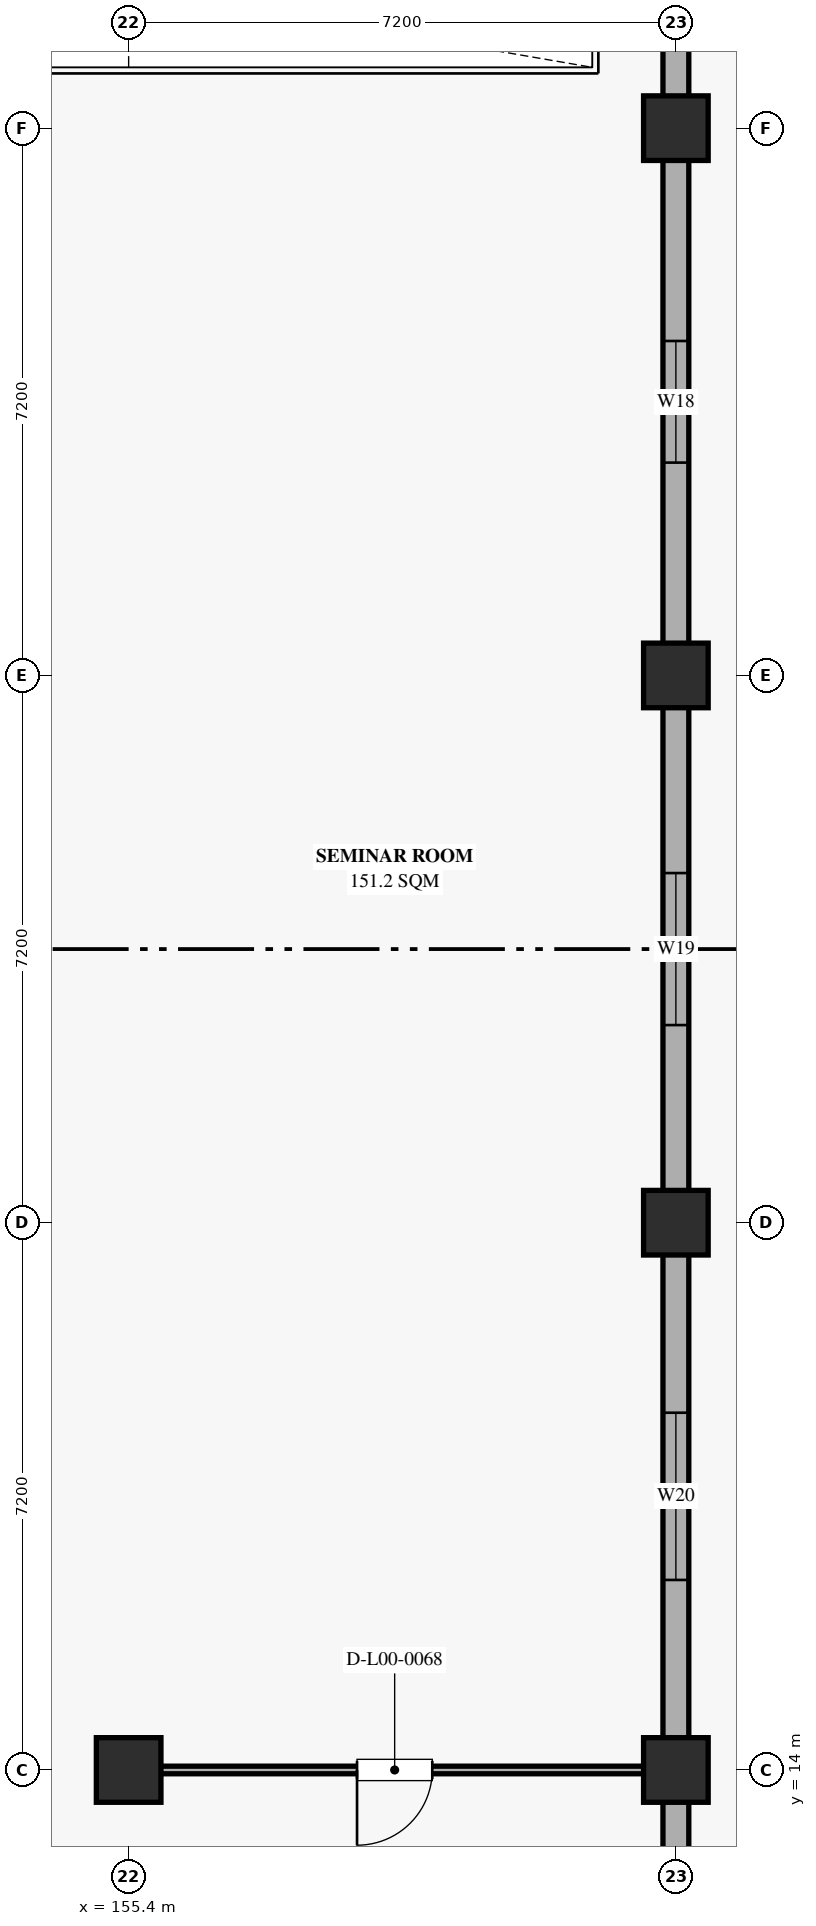
"""IFC4 building model, lengths in metres.
Left out: names, types, materials, properties, quantities, classifications, styles, units other than length and angle.
Written with IfcOpenShell. Run it as: python <this file> out.ifc"""

import sys

from ifc_helpers import new_model, si_unit, direction, frame, frame_2d, origin, origin_2d, place, context, subcontext, project, spatial, rectangle, extrude, element, fill, save


model = new_model("IFC4")
c1 = context("Model", 3, precision=1e-05, world=origin(), true_north=direction((0.0, 1.0)))
c2 = subcontext(c1, "Body", "Model", "MODEL_VIEW")
j1 = project(units=[si_unit("LENGTHUNIT", "METRE"), si_unit("PLANEANGLEUNIT", "RADIAN")], contexts=[c1])
p1 = place(None, origin())
s1 = spatial("IfcSite", under=j1, at=p1, CompositionType="ELEMENT")
p2 = place(p1, origin())
s2 = spatial("IfcBuilding", under=s1, at=p2, CompositionType="ELEMENT")
p3 = place(p2, origin())
s3 = spatial("IfcBuildingStorey", under=s2, at=p3, CompositionType="ELEMENT", Elevation=0.0)
for number, where, z_axis, x_axis in (
    (1, (155.4, 14.0, 0.0), (0.0, 0.0, 1.0), (1.0, 0.0, 0.0)),
    (2, (162.6, 14.0, 0.0), (0.0, 0.0, 1.0), (1.0, 0.0, 0.0)),
    (3, (162.6, 21.2, 0.0), (0.0, 0.0, 1.0), (1.0, 0.0, 0.0)),
    (4, (162.6, 28.4, 0.0), (0.0, 0.0, 1.0), (1.0, 0.0, 0.0)),
    (5, (162.6, 35.6, 0.0), (0.0, 0.0, 1.0), (1.0, 0.0, 0.0)),
):
    element("IfcColumn", number, at=place(p3, frame(where, z_axis=z_axis, x_axis=x_axis)), inside=s3, PredefinedType="COLUMN", context=c2, shape_type="SweptSolid", body=[
        extrude(rectangle(XDim=0.85, YDim=0.85, at=origin_2d()), origin(), (0.0, 0.0, 1.0), 5.4),
    ])
p4 = place(p3, frame((162.6, 42.39, 0.0), z_axis=(0.0, 0.0, 1.0), x_axis=(0.0, -1.0, 0.0)))
e6 = element("IfcWall", 6, at=p4, inside=s3, PredefinedType="SOLIDWALL", context=c2, shape_type="SweptSolid", body=[
    extrude(rectangle(XDim=6.38, YDim=0.34, at=frame_2d((3.19, 0.0))), origin(), (0.0, 0.0, 1.0), 3.9),
])
p5 = place(p4, frame((1.69, 0.0, 0.9)))
e7 = element("IfcOpeningElement", 7, at=p5, cuts=e6, PredefinedType="OPENING", context=c2, shape_type="SweptSolid", body=[
    extrude(rectangle(XDim=3.0, YDim=2.5, at=frame_2d((1.5, 1.25))), frame((0.0, 0.18, 0.0), z_axis=(0.0, -1.0, 0.0), x_axis=(1.0, 0.0, 0.0)), (0.0, 0.0, 1.0), 0.36),
])
p6 = place(p3, frame((162.6, 35.19, 0.0), z_axis=(0.0, 0.0, 1.0), x_axis=(0.0, -1.0, 0.0)))
e8 = element("IfcWall", 8, at=p6, inside=s3, PredefinedType="SOLIDWALL", context=c2, shape_type="SweptSolid", body=[
    extrude(rectangle(XDim=6.38, YDim=0.34, at=frame_2d((3.19, 0.0))), origin(), (0.0, 0.0, 1.0), 3.9),
])
p7 = place(p6, frame((2.39, 0.0, 0.9)))
e9 = element("IfcOpeningElement", 9, at=p7, cuts=e8, PredefinedType="OPENING", context=c2, shape_type="SweptSolid", body=[
    extrude(rectangle(XDim=1.6, YDim=2.2, at=frame_2d((0.8, 1.1))), frame((0.0, 0.18, 0.0), z_axis=(0.0, -1.0, 0.0), x_axis=(1.0, 0.0, 0.0)), (0.0, 0.0, 1.0), 0.36),
])
p8 = place(p3, frame((162.6, 27.99, 0.0), z_axis=(0.0, 0.0, 1.0), x_axis=(0.0, -1.0, 0.0)))
e10 = element("IfcWall", 10, at=p8, inside=s3, PredefinedType="SOLIDWALL", context=c2, shape_type="SweptSolid", body=[
    extrude(rectangle(XDim=6.38, YDim=0.34, at=frame_2d((3.19, 0.0))), origin(), (0.0, 0.0, 1.0), 3.9),
])
p9 = place(p8, frame((2.19, 0.0, 0.9)))
e11 = element("IfcOpeningElement", 11, at=p9, cuts=e10, PredefinedType="OPENING", context=c2, shape_type="SweptSolid", body=[
    extrude(rectangle(XDim=2.0, YDim=2.2, at=frame_2d((1.0, 1.1))), frame((0.0, 0.18, 0.0), z_axis=(0.0, -1.0, 0.0), x_axis=(1.0, 0.0, 0.0)), (0.0, 0.0, 1.0), 0.36),
])
p10 = place(p3, frame((162.6, 20.79, 0.0), z_axis=(0.0, 0.0, 1.0), x_axis=(0.0, -1.0, 0.0)))
e12 = element("IfcWall", 12, at=p10, inside=s3, PredefinedType="SOLIDWALL", context=c2, shape_type="SweptSolid", body=[
    extrude(rectangle(XDim=6.38, YDim=0.34, at=frame_2d((3.19, 0.0))), origin(), (0.0, 0.0, 1.0), 3.9),
])
p11 = place(p10, frame((2.09, 0.0, 0.9)))
e13 = element("IfcOpeningElement", 13, at=p11, cuts=e12, PredefinedType="OPENING", context=c2, shape_type="SweptSolid", body=[
    extrude(rectangle(XDim=2.2, YDim=2.0, at=frame_2d((1.1, 1.0))), frame((0.0, 0.18, 0.0), z_axis=(0.0, -1.0, 0.0), x_axis=(1.0, 0.0, 0.0)), (0.0, 0.0, 1.0), 0.36),
])
p12 = place(p3, frame((162.6, 13.59, 0.0), z_axis=(0.0, 0.0, 1.0), x_axis=(0.0, -1.0, 0.0)))
e14 = element("IfcWall", 14, at=p12, inside=s3, PredefinedType="SOLIDWALL", context=c2, shape_type="SweptSolid", body=[
    extrude(rectangle(XDim=6.38, YDim=0.34, at=frame_2d((3.19, 0.0))), origin(), (0.0, 0.0, 1.0), 3.9),
])
p13 = place(p12, frame((2.29, 0.0, 0.0)))
e15 = element("IfcOpeningElement", 15, at=p13, cuts=e14, PredefinedType="OPENING", context=c2, shape_type="SweptSolid", body=[
    extrude(rectangle(XDim=1.8, YDim=2.35, at=frame_2d((0.9, 1.175))), frame((0.0, 0.18, 0.0), z_axis=(0.0, -1.0, 0.0), x_axis=(1.0, 0.0, 0.0)), (0.0, 0.0, 1.0), 0.36),
])
p14 = place(p3, frame((162.25, 14.0, 0.0), z_axis=(0.0, 0.0, 1.0), x_axis=(-1.0, 0.0, 0.0)))
e16 = element("IfcWall", 16, at=p14, inside=s3, PredefinedType="PARTITIONING", context=c2, shape_type="SweptSolid", body=[
    extrude(rectangle(XDim=6.7, YDim=0.1, at=frame_2d((3.35, 0.0))), origin(), (0.0, 0.0, 1.0), 3.88),
])
p15 = place(p14, frame((2.855, 0.0, 0.0)))
e17 = element("IfcOpeningElement", 17, at=p15, cuts=e16, PredefinedType="OPENING", context=c2, shape_type="SweptSolid", body=[
    extrude(rectangle(XDim=0.99, YDim=2.1, at=frame_2d((0.495, 1.05))), frame((0.0, 0.06, 0.0), z_axis=(0.0, -1.0, 0.0), x_axis=(1.0, 0.0, 0.0)), (0.0, 0.0, 1.0), 0.12),
])
p16 = place(p7, origin())
e18 = element("IfcWindow", 18, at=p16, inside=s3, PartitioningType="SINGLE_PANEL", PredefinedType="WINDOW", context=c2, shape_type="SweptSolid", body=[
    extrude(rectangle(XDim=1.6, YDim=2.2, at=frame_2d((0.8, 1.1))), frame((0.0, 0.03, 0.0), z_axis=(0.0, -1.0, 0.0), x_axis=(1.0, 0.0, 0.0)), (0.0, 0.0, 1.0), 0.06),
])
fill(e9, e18)
p17 = place(p9, origin())
e19 = element("IfcWindow", 19, at=p17, inside=s3, PartitioningType="DOUBLE_PANEL_VERTICAL", PredefinedType="WINDOW", context=c2, shape_type="SweptSolid", body=[
    extrude(rectangle(XDim=2.0, YDim=2.2, at=frame_2d((1.0, 1.1))), frame((0.0, 0.03, 0.0), z_axis=(0.0, -1.0, 0.0), x_axis=(1.0, 0.0, 0.0)), (0.0, 0.0, 1.0), 0.06),
])
fill(e11, e19)
p18 = place(p11, origin())
e20 = element("IfcWindow", 20, at=p18, inside=s3, PartitioningType="DOUBLE_PANEL_VERTICAL", PredefinedType="WINDOW", context=c2, shape_type="SweptSolid", body=[
    extrude(rectangle(XDim=2.2, YDim=2.0, at=frame_2d((1.1, 1.0))), frame((0.0, 0.03, 0.0), z_axis=(0.0, -1.0, 0.0), x_axis=(1.0, 0.0, 0.0)), (0.0, 0.0, 1.0), 0.06),
])
fill(e13, e20)
p19 = place(p15, origin())
e21 = element("IfcDoor", 21, at=p19, inside=s3, OperationType="SINGLE_SWING_RIGHT", PredefinedType="DOOR", context=c2, shape_type="SweptSolid", body=[
    extrude(rectangle(XDim=0.99, YDim=2.1, at=frame_2d((0.495, 1.05))), frame((0.0, 0.025, 0.0), z_axis=(0.0, -1.0, 0.0), x_axis=(1.0, 0.0, 0.0)), (0.0, 0.0, 1.0), 0.05),
])
fill(e17, e21)
save(model, sys.argv[1])
